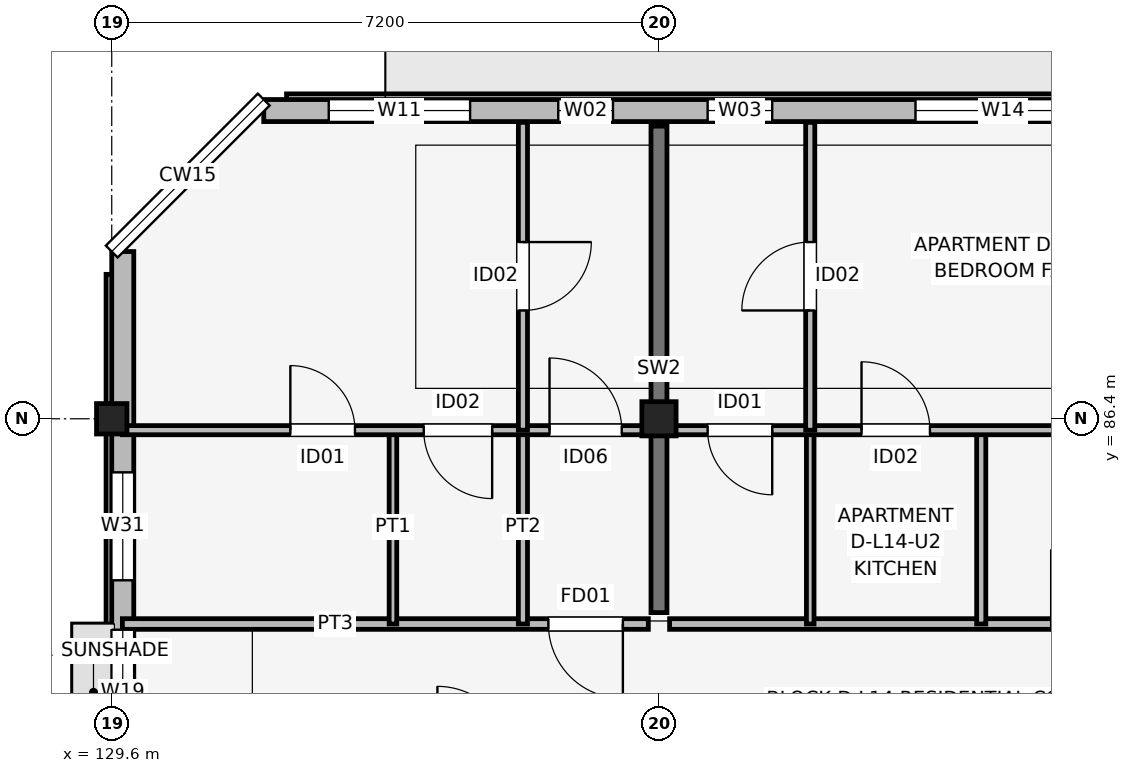
"""IFC4 building model, lengths in metres.
Left out: names, types, materials, properties, quantities, classifications, styles, units other than length and angle.
Written with IfcOpenShell. Run it as: python <this file> out.ifc"""

import sys

from ifc_helpers import new_model, si_unit, direction, frame, frame_2d, origin, origin_2d, place, context, subcontext, project, spatial, rectangle, extrude, element, fill, save


model = new_model("IFC4")
c1 = context("Model", 3, precision=1e-05, world=origin(), true_north=direction((0.0, 1.0)))
c2 = subcontext(c1, "Body", "Model", "MODEL_VIEW")
j1 = project(units=[si_unit("LENGTHUNIT", "METRE"), si_unit("PLANEANGLEUNIT", "RADIAN")], contexts=[c1])
p1 = place(None, origin())
s1 = spatial("IfcSite", under=j1, at=p1, CompositionType="ELEMENT")
p2 = place(p1, origin())
s2 = spatial("IfcBuilding", under=s1, at=p2, CompositionType="ELEMENT")
p3 = place(p2, frame((0.0, 0.0, 46.5)))
s3 = spatial("IfcBuildingStorey", under=s2, at=p3, CompositionType="ELEMENT", Elevation=46.5)
p4 = place(p3, frame((129.6, 86.4, 0.0), z_axis=(0.0, 0.0, 1.0), x_axis=(1.0, 0.0, 0.0)))
e1 = element("IfcColumn", 1, at=p4, inside=s3, PredefinedType="COLUMN", context=c2, shape_type="SweptSolid", body=[
    extrude(rectangle(XDim=0.4, YDim=0.4, at=origin_2d()), origin(), (0.0, 0.0, 1.0), 3.15),
])
p5 = place(p3, frame((136.8, 86.4, 0.0), z_axis=(0.0, 0.0, 1.0), x_axis=(1.0, 0.0, 0.0)))
e2 = element("IfcColumn", 2, at=p5, inside=s3, PredefinedType="COLUMN", context=c2, shape_type="SweptSolid", body=[
    extrude(rectangle(XDim=0.45, YDim=0.45, at=origin_2d()), origin(), (0.0, 0.0, 1.0), 3.15),
])
p6 = place(p3, frame((136.8, 83.85, 0.0), z_axis=(0.0, 0.0, 1.0), x_axis=(0.0, 1.0, 0.0)))
e3 = element("IfcWall", 3, at=p6, inside=s3, PredefinedType="SHEAR", context=c2, shape_type="SweptSolid", body=[
    extrude(rectangle(XDim=6.4, YDim=0.21, at=frame_2d((3.2, 0.0))), origin(), (0.0, 0.0, 1.0), 3.15),
])
p7 = place(p3, frame((163.6, 90.455, 0.0), z_axis=(0.0, 0.0, 1.0), x_axis=(-1.0, 0.0, 0.0)))
e4 = element("IfcWall", 4, at=p7, inside=s3, PredefinedType="SOLIDWALL", context=c2, shape_type="SweptSolid", body=[
    extrude(rectangle(XDim=32.0, YDim=0.29, at=frame_2d((16.0, 0.0))), origin(), (0.0, 0.0, 1.0), 2.48),
])
p8 = place(p7, frame((15.45, 0.0, 0.0), z_axis=(0.0, 0.0, 1.0), x_axis=(-1.0, 0.0, 0.0)))
e5 = element("IfcOpeningElement", 5, at=p8, cuts=e4, PredefinedType="OPENING", context=c2, shape_type="SweptSolid", body=[
    extrude(rectangle(XDim=2.1, YDim=2.2, at=frame_2d((1.05, 1.1))), frame((0.0, 0.155, 0.0), z_axis=(0.0, -1.0, 0.0), x_axis=(1.0, 0.0, 0.0)), (0.0, 0.0, 1.0), 0.31),
])
p9 = place(p7, frame((29.285, 0.0, 0.7)))
e6 = element("IfcOpeningElement", 6, at=p9, cuts=e4, PredefinedType="OPENING", context=c2, shape_type="SweptSolid", body=[
    extrude(rectangle(XDim=1.86, YDim=1.6, at=frame_2d((0.93, 0.8))), frame((0.0, 0.155, 0.0), z_axis=(0.0, -1.0, 0.0), x_axis=(1.0, 0.0, 0.0)), (0.0, 0.0, 1.0), 0.31),
])
p10 = place(p7, frame((27.405, 0.0, 0.75)))
e7 = element("IfcOpeningElement", 7, at=p10, cuts=e4, PredefinedType="OPENING", context=c2, shape_type="SweptSolid", body=[
    extrude(rectangle(XDim=0.72, YDim=1.35, at=frame_2d((0.36, 0.675))), frame((0.0, 0.155, 0.0), z_axis=(0.0, -1.0, 0.0), x_axis=(1.0, 0.0, 0.0)), (0.0, 0.0, 1.0), 0.31),
])
p11 = place(p7, frame((25.31, 0.0, 0.75)))
e8 = element("IfcOpeningElement", 8, at=p11, cuts=e4, PredefinedType="OPENING", context=c2, shape_type="SweptSolid", body=[
    extrude(rectangle(XDim=0.85, YDim=1.4, at=frame_2d((0.425, 0.7))), frame((0.0, 0.155, 0.0), z_axis=(0.0, -1.0, 0.0), x_axis=(1.0, 0.0, 0.0)), (0.0, 0.0, 1.0), 0.31),
])
p12 = place(p7, frame((21.125, 0.0, 0.7)))
e9 = element("IfcOpeningElement", 9, at=p12, cuts=e4, PredefinedType="OPENING", context=c2, shape_type="SweptSolid", body=[
    extrude(rectangle(XDim=2.3, YDim=1.65, at=frame_2d((1.15, 0.825))), frame((0.0, 0.155, 0.0), z_axis=(0.0, -1.0, 0.0), x_axis=(1.0, 0.0, 0.0)), (0.0, 0.0, 1.0), 0.31),
])
p13 = place(p7, frame((16.335, 0.0, 0.7)))
e10 = element("IfcOpeningElement", 10, at=p13, cuts=e4, PredefinedType="OPENING", context=c2, shape_type="SweptSolid", body=[
    extrude(rectangle(XDim=2.45, YDim=1.65, at=frame_2d((1.225, 0.825))), frame((0.0, 0.155, 0.0), z_axis=(0.0, -1.0, 0.0), x_axis=(1.0, 0.0, 0.0)), (0.0, 0.0, 1.0), 0.31),
])
p14 = place(p7, frame((10.725, 0.0, 0.75)))
e11 = element("IfcOpeningElement", 11, at=p14, cuts=e4, PredefinedType="OPENING", context=c2, shape_type="SweptSolid", body=[
    extrude(rectangle(XDim=1.22, YDim=1.5, at=frame_2d((0.61, 0.75))), frame((0.0, 0.155, 0.0), z_axis=(0.0, -1.0, 0.0), x_axis=(1.0, 0.0, 0.0)), (0.0, 0.0, 1.0), 0.31),
])
p15 = place(p7, frame((7.015, 0.0, 0.7)))
e12 = element("IfcOpeningElement", 12, at=p15, cuts=e4, PredefinedType="OPENING", context=c2, shape_type="SweptSolid", body=[
    extrude(rectangle(XDim=1.72, YDim=1.6, at=frame_2d((0.86, 0.8))), frame((0.0, 0.155, 0.0), z_axis=(0.0, -1.0, 0.0), x_axis=(1.0, 0.0, 0.0)), (0.0, 0.0, 1.0), 0.31),
])
p16 = place(p7, frame((3.375, 0.0, 0.75)))
e13 = element("IfcOpeningElement", 13, at=p16, cuts=e4, PredefinedType="OPENING", context=c2, shape_type="SweptSolid", body=[
    extrude(rectangle(XDim=1.46, YDim=1.55, at=frame_2d((0.73, 0.775))), frame((0.0, 0.155, 0.0), z_axis=(0.0, -1.0, 0.0), x_axis=(1.0, 0.0, 0.0)), (0.0, 0.0, 1.0), 0.31),
])
p17 = place(p7, frame((1.355, 0.0, 0.75)))
e14 = element("IfcOpeningElement", 14, at=p17, cuts=e4, PredefinedType="OPENING", context=c2, shape_type="SweptSolid", body=[
    extrude(rectangle(XDim=0.6, YDim=1.25, at=frame_2d((0.3, 0.625))), frame((0.0, 0.155, 0.0), z_axis=(0.0, -1.0, 0.0), x_axis=(1.0, 0.0, 0.0)), (0.0, 0.0, 1.0), 0.31),
])
p18 = place(p3, frame((129.745, 88.6, 0.0), z_axis=(0.0, 0.0, 1.0), x_axis=(0.0, -1.0, 0.0)))
e15 = element("IfcWall", 15, at=p18, inside=s3, PredefinedType="SOLIDWALL", context=c2, shape_type="SweptSolid", body=[
    extrude(rectangle(XDim=14.6, YDim=0.29, at=frame_2d((7.3, 0.0))), origin(), (0.0, 0.0, 1.0), 2.51),
])
p19 = place(p18, frame((4.975, 0.0, 1.05)))
e16 = element("IfcOpeningElement", 16, at=p19, cuts=e15, PredefinedType="OPENING", context=c2, shape_type="SweptSolid", body=[
    extrude(rectangle(XDim=1.65, YDim=1.15, at=frame_2d((0.825, 0.575))), frame((0.0, 0.155, 0.0), z_axis=(0.0, -1.0, 0.0), x_axis=(1.0, 0.0, 0.0)), (0.0, 0.0, 1.0), 0.31),
])
p20 = place(p18, frame((2.905, 0.0, 0.75)))
e17 = element("IfcOpeningElement", 17, at=p20, cuts=e15, PredefinedType="OPENING", context=c2, shape_type="SweptSolid", body=[
    extrude(rectangle(XDim=1.42, YDim=1.6, at=frame_2d((0.71, 0.8))), frame((0.0, 0.155, 0.0), z_axis=(0.0, -1.0, 0.0), x_axis=(1.0, 0.0, 0.0)), (0.0, 0.0, 1.0), 0.31),
])
p21 = place(p3, frame((129.74, 83.7, 0.0), z_axis=(0.0, 0.0, 1.0), x_axis=(1.0, 0.0, 0.0)))
e18 = element("IfcWall", 18, at=p21, inside=s3, PredefinedType="PARTITIONING", context=c2, shape_type="SweptSolid", body=[
    extrude(rectangle(XDim=6.92, YDim=0.14, at=frame_2d((3.46, 0.0))), origin(), (0.0, 0.0, 1.0), 2.38),
])
p22 = place(p21, frame((6.585, 0.0, 0.0), z_axis=(0.0, 0.0, 1.0), x_axis=(-1.0, 0.0, 0.0)))
e19 = element("IfcOpeningElement", 19, at=p22, cuts=e18, PredefinedType="OPENING", context=c2, shape_type="SweptSolid", body=[
    extrude(rectangle(XDim=0.98, YDim=2.1, at=frame_2d((0.49, 1.05))), frame((0.0, 0.08, 0.0), z_axis=(0.0, -1.0, 0.0), x_axis=(1.0, 0.0, 0.0)), (0.0, 0.0, 1.0), 0.16),
])
p23 = place(p3, frame((133.3, 83.7, 0.0), z_axis=(0.0, 0.0, 1.0), x_axis=(0.0, 1.0, 0.0)))
e20 = element("IfcWall", 20, at=p23, inside=s3, PredefinedType="PARTITIONING", context=c2, shape_type="SweptSolid", body=[
    extrude(rectangle(XDim=2.55, YDim=0.1, at=frame_2d((1.275, 0.0))), origin(), (0.0, 0.0, 1.0), 2.38),
])
p24 = place(p3, frame((135.01, 83.7, 0.0), z_axis=(0.0, 0.0, 1.0), x_axis=(0.0, 1.0, 0.0)))
e21 = element("IfcWall", 21, at=p24, inside=s3, PredefinedType="PARTITIONING", context=c2, shape_type="SweptSolid", body=[
    extrude(rectangle(XDim=2.55, YDim=0.12, at=frame_2d((1.275, 0.0))), origin(), (0.0, 0.0, 1.0), 2.38),
])
p25 = place(p3, frame((129.74, 86.25, 0.0), z_axis=(0.0, 0.0, 1.0), x_axis=(1.0, 0.0, 0.0)))
e22 = element("IfcWall", 22, at=p25, inside=s3, PredefinedType="PARTITIONING", context=c2, shape_type="SweptSolid", body=[
    extrude(rectangle(XDim=6.92, YDim=0.12, at=frame_2d((3.46, 0.0))), origin(), (0.0, 0.0, 1.0), 2.38),
])
p26 = place(p25, frame((2.21, 0.0, 0.0)))
e23 = element("IfcOpeningElement", 23, at=p26, cuts=e22, PredefinedType="OPENING", context=c2, shape_type="SweptSolid", body=[
    extrude(rectangle(XDim=0.85, YDim=2.08, at=frame_2d((0.425, 1.04))), frame((0.0, 0.07, 0.0), z_axis=(0.0, -1.0, 0.0), x_axis=(1.0, 0.0, 0.0)), (0.0, 0.0, 1.0), 0.14),
])
p27 = place(p25, frame((4.865, 0.0, 0.0), z_axis=(0.0, 0.0, 1.0), x_axis=(-1.0, 0.0, 0.0)))
e24 = element("IfcOpeningElement", 24, at=p27, cuts=e22, PredefinedType="OPENING", context=c2, shape_type="SweptSolid", body=[
    extrude(rectangle(XDim=0.9, YDim=2.08, at=frame_2d((0.45, 1.04))), frame((0.0, 0.07, 0.0), z_axis=(0.0, -1.0, 0.0), x_axis=(1.0, 0.0, 0.0)), (0.0, 0.0, 1.0), 0.14),
])
p28 = place(p25, frame((5.62, 0.0, 0.0)))
e25 = element("IfcOpeningElement", 25, at=p28, cuts=e22, PredefinedType="OPENING", context=c2, shape_type="SweptSolid", body=[
    extrude(rectangle(XDim=0.95, YDim=2.08, at=frame_2d((0.475, 1.04))), frame((0.0, 0.07, 0.0), z_axis=(0.0, -1.0, 0.0), x_axis=(1.0, 0.0, 0.0)), (0.0, 0.0, 1.0), 0.14),
])
p29 = place(p3, frame((135.01, 86.25, 0.0), z_axis=(0.0, 0.0, 1.0), x_axis=(0.0, 1.0, 0.0)))
e26 = element("IfcWall", 26, at=p29, inside=s3, PredefinedType="PARTITIONING", context=c2, shape_type="SweptSolid", body=[
    extrude(rectangle(XDim=4.05, YDim=0.12, at=frame_2d((2.025, 0.0))), origin(), (0.0, 0.0, 1.0), 2.38),
])
p30 = place(p29, frame((2.475, 0.0, 0.0), z_axis=(0.0, 0.0, 1.0), x_axis=(-1.0, 0.0, 0.0)))
e27 = element("IfcOpeningElement", 27, at=p30, cuts=e26, PredefinedType="OPENING", context=c2, shape_type="SweptSolid", body=[
    extrude(rectangle(XDim=0.9, YDim=2.08, at=frame_2d((0.45, 1.04))), frame((0.0, 0.07, 0.0), z_axis=(0.0, -1.0, 0.0), x_axis=(1.0, 0.0, 0.0)), (0.0, 0.0, 1.0), 0.14),
])
p31 = place(p3, frame((136.94, 83.7, 0.0), z_axis=(0.0, 0.0, 1.0), x_axis=(1.0, 0.0, 0.0)))
e28 = element("IfcWall", 28, at=p31, inside=s3, PredefinedType="PARTITIONING", context=c2, shape_type="SweptSolid", body=[
    extrude(rectangle(XDim=6.92, YDim=0.14, at=frame_2d((3.46, 0.0))), origin(), (0.0, 0.0, 1.0), 2.38),
])
p32 = place(p31, frame((5.02, 0.0, 0.0)))
e29 = element("IfcOpeningElement", 29, at=p32, cuts=e28, PredefinedType="OPENING", context=c2, shape_type="SweptSolid", body=[
    extrude(rectangle(XDim=0.98, YDim=2.1, at=frame_2d((0.49, 1.05))), frame((0.0, 0.08, 0.0), z_axis=(0.0, -1.0, 0.0), x_axis=(1.0, 0.0, 0.0)), (0.0, 0.0, 1.0), 0.16),
])
p33 = place(p3, frame((138.79, 83.7, 0.0), z_axis=(0.0, 0.0, 1.0), x_axis=(0.0, 1.0, 0.0)))
e30 = element("IfcWall", 30, at=p33, inside=s3, PredefinedType="PARTITIONING", context=c2, shape_type="SweptSolid", body=[
    extrude(rectangle(XDim=2.55, YDim=0.1, at=frame_2d((1.275, 0.0))), origin(), (0.0, 0.0, 1.0), 2.38),
])
p34 = place(p3, frame((141.04, 83.7, 0.0), z_axis=(0.0, 0.0, 1.0), x_axis=(0.0, 1.0, 0.0)))
e31 = element("IfcWall", 31, at=p34, inside=s3, PredefinedType="PARTITIONING", context=c2, shape_type="SweptSolid", body=[
    extrude(rectangle(XDim=2.55, YDim=0.12, at=frame_2d((1.275, 0.0))), origin(), (0.0, 0.0, 1.0), 2.38),
])
p35 = place(p3, frame((136.94, 86.25, 0.0), z_axis=(0.0, 0.0, 1.0), x_axis=(1.0, 0.0, 0.0)))
e32 = element("IfcWall", 32, at=p35, inside=s3, PredefinedType="PARTITIONING", context=c2, shape_type="SweptSolid", body=[
    extrude(rectangle(XDim=6.92, YDim=0.12, at=frame_2d((3.46, 0.0))), origin(), (0.0, 0.0, 1.0), 2.38),
])
p36 = place(p35, frame((1.35, 0.0, 0.0), z_axis=(0.0, 0.0, 1.0), x_axis=(-1.0, 0.0, 0.0)))
e33 = element("IfcOpeningElement", 33, at=p36, cuts=e32, PredefinedType="OPENING", context=c2, shape_type="SweptSolid", body=[
    extrude(rectangle(XDim=0.85, YDim=2.08, at=frame_2d((0.425, 1.04))), frame((0.0, 0.07, 0.0), z_axis=(0.0, -1.0, 0.0), x_axis=(1.0, 0.0, 0.0)), (0.0, 0.0, 1.0), 0.14),
])
p37 = place(p35, frame((2.525, 0.0, 0.0)))
e34 = element("IfcOpeningElement", 34, at=p37, cuts=e32, PredefinedType="OPENING", context=c2, shape_type="SweptSolid", body=[
    extrude(rectangle(XDim=0.9, YDim=2.08, at=frame_2d((0.45, 1.04))), frame((0.0, 0.07, 0.0), z_axis=(0.0, -1.0, 0.0), x_axis=(1.0, 0.0, 0.0)), (0.0, 0.0, 1.0), 0.14),
])
p38 = place(p35, frame((5.985, 0.0, 0.0), z_axis=(0.0, 0.0, 1.0), x_axis=(-1.0, 0.0, 0.0)))
e35 = element("IfcOpeningElement", 35, at=p38, cuts=e32, PredefinedType="OPENING", context=c2, shape_type="SweptSolid", body=[
    extrude(rectangle(XDim=0.95, YDim=2.08, at=frame_2d((0.475, 1.04))), frame((0.0, 0.07, 0.0), z_axis=(0.0, -1.0, 0.0), x_axis=(1.0, 0.0, 0.0)), (0.0, 0.0, 1.0), 0.14),
])
p39 = place(p3, frame((138.79, 86.25, 0.0), z_axis=(0.0, 0.0, 1.0), x_axis=(0.0, 1.0, 0.0)))
e36 = element("IfcWall", 36, at=p39, inside=s3, PredefinedType="PARTITIONING", context=c2, shape_type="SweptSolid", body=[
    extrude(rectangle(XDim=4.05, YDim=0.12, at=frame_2d((2.025, 0.0))), origin(), (0.0, 0.0, 1.0), 2.38),
])
p40 = place(p39, frame((1.575, 0.0, 0.0)))
e37 = element("IfcOpeningElement", 37, at=p40, cuts=e36, PredefinedType="OPENING", context=c2, shape_type="SweptSolid", body=[
    extrude(rectangle(XDim=0.9, YDim=2.08, at=frame_2d((0.45, 1.04))), frame((0.0, 0.07, 0.0), z_axis=(0.0, -1.0, 0.0), x_axis=(1.0, 0.0, 0.0)), (0.0, 0.0, 1.0), 0.14),
])
p41 = place(p9, origin())
e38 = element("IfcWindow", 38, at=p41, inside=s3, PartitioningType="SINGLE_PANEL", PredefinedType="WINDOW", context=c2, shape_type="SweptSolid", body=[
    extrude(rectangle(XDim=1.86, YDim=1.6, at=frame_2d((0.93, 0.8))), frame((0.0, 0.03, 0.0), z_axis=(0.0, -1.0, 0.0), x_axis=(1.0, 0.0, 0.0)), (0.0, 0.0, 1.0), 0.06),
])
fill(e6, e38)
p42 = place(p10, origin())
e39 = element("IfcWindow", 39, at=p42, inside=s3, PartitioningType="SINGLE_PANEL", PredefinedType="WINDOW", context=c2, shape_type="SweptSolid", body=[
    extrude(rectangle(XDim=0.72, YDim=1.35, at=frame_2d((0.36, 0.675))), frame((0.0, 0.03, 0.0), z_axis=(0.0, -1.0, 0.0), x_axis=(1.0, 0.0, 0.0)), (0.0, 0.0, 1.0), 0.06),
])
fill(e7, e39)
p43 = place(p11, origin())
e40 = element("IfcWindow", 40, at=p43, inside=s3, PartitioningType="SINGLE_PANEL", PredefinedType="WINDOW", context=c2, shape_type="SweptSolid", body=[
    extrude(rectangle(XDim=0.85, YDim=1.4, at=frame_2d((0.425, 0.7))), frame((0.0, 0.03, 0.0), z_axis=(0.0, -1.0, 0.0), x_axis=(1.0, 0.0, 0.0)), (0.0, 0.0, 1.0), 0.06),
])
fill(e8, e40)
p44 = place(p12, origin())
e41 = element("IfcWindow", 41, at=p44, inside=s3, PartitioningType="SINGLE_PANEL", PredefinedType="WINDOW", context=c2, shape_type="SweptSolid", body=[
    extrude(rectangle(XDim=2.3, YDim=1.65, at=frame_2d((1.15, 0.825))), frame((0.0, 0.03, 0.0), z_axis=(0.0, -1.0, 0.0), x_axis=(1.0, 0.0, 0.0)), (0.0, 0.0, 1.0), 0.06),
])
fill(e9, e41)
p45 = place(p19, origin())
e42 = element("IfcWindow", 42, at=p45, inside=s3, PartitioningType="SINGLE_PANEL", PredefinedType="WINDOW", context=c2, shape_type="SweptSolid", body=[
    extrude(rectangle(XDim=1.65, YDim=1.15, at=frame_2d((0.825, 0.575))), frame((0.0, 0.03, 0.0), z_axis=(0.0, -1.0, 0.0), x_axis=(1.0, 0.0, 0.0)), (0.0, 0.0, 1.0), 0.06),
])
fill(e16, e42)
p46 = place(p20, origin())
e43 = element("IfcWindow", 43, at=p46, inside=s3, PartitioningType="SINGLE_PANEL", PredefinedType="WINDOW", context=c2, shape_type="SweptSolid", body=[
    extrude(rectangle(XDim=1.42, YDim=1.6, at=frame_2d((0.71, 0.8))), frame((0.0, 0.03, 0.0), z_axis=(0.0, -1.0, 0.0), x_axis=(1.0, 0.0, 0.0)), (0.0, 0.0, 1.0), 0.06),
])
fill(e17, e43)
p47 = place(p22, origin())
e44 = element("IfcDoor", 44, at=p47, inside=s3, OperationType="SINGLE_SWING_RIGHT", PredefinedType="DOOR", context=c2, shape_type="SweptSolid", body=[
    extrude(rectangle(XDim=0.98, YDim=2.1, at=frame_2d((0.49, 1.05))), frame((0.0, 0.025, 0.0), z_axis=(0.0, -1.0, 0.0), x_axis=(1.0, 0.0, 0.0)), (0.0, 0.0, 1.0), 0.05),
])
fill(e19, e44)
p48 = place(p26, origin())
e45 = element("IfcDoor", 45, at=p48, inside=s3, OperationType="SINGLE_SWING_LEFT", PredefinedType="DOOR", context=c2, shape_type="SweptSolid", body=[
    extrude(rectangle(XDim=0.85, YDim=2.08, at=frame_2d((0.425, 1.04))), frame((0.0, 0.025, 0.0), z_axis=(0.0, -1.0, 0.0), x_axis=(1.0, 0.0, 0.0)), (0.0, 0.0, 1.0), 0.05),
])
fill(e23, e45)
p49 = place(p27, origin())
e46 = element("IfcDoor", 46, at=p49, inside=s3, OperationType="SINGLE_SWING_RIGHT", PredefinedType="DOOR", context=c2, shape_type="SweptSolid", body=[
    extrude(rectangle(XDim=0.9, YDim=2.08, at=frame_2d((0.45, 1.04))), frame((0.0, 0.025, 0.0), z_axis=(0.0, -1.0, 0.0), x_axis=(1.0, 0.0, 0.0)), (0.0, 0.0, 1.0), 0.05),
])
fill(e24, e46)
p50 = place(p28, origin())
e47 = element("IfcDoor", 47, at=p50, inside=s3, OperationType="SINGLE_SWING_LEFT", PredefinedType="DOOR", context=c2, shape_type="SweptSolid", body=[
    extrude(rectangle(XDim=0.95, YDim=2.08, at=frame_2d((0.475, 1.04))), frame((0.0, 0.025, 0.0), z_axis=(0.0, -1.0, 0.0), x_axis=(1.0, 0.0, 0.0)), (0.0, 0.0, 1.0), 0.05),
])
fill(e25, e47)
p51 = place(p30, origin())
e48 = element("IfcDoor", 48, at=p51, inside=s3, OperationType="SINGLE_SWING_RIGHT", PredefinedType="DOOR", context=c2, shape_type="SweptSolid", body=[
    extrude(rectangle(XDim=0.9, YDim=2.08, at=frame_2d((0.45, 1.04))), frame((0.0, 0.025, 0.0), z_axis=(0.0, -1.0, 0.0), x_axis=(1.0, 0.0, 0.0)), (0.0, 0.0, 1.0), 0.05),
])
fill(e27, e48)
p52 = place(p36, origin())
e49 = element("IfcDoor", 49, at=p52, inside=s3, OperationType="SINGLE_SWING_RIGHT", PredefinedType="DOOR", context=c2, shape_type="SweptSolid", body=[
    extrude(rectangle(XDim=0.85, YDim=2.08, at=frame_2d((0.425, 1.04))), frame((0.0, 0.025, 0.0), z_axis=(0.0, -1.0, 0.0), x_axis=(1.0, 0.0, 0.0)), (0.0, 0.0, 1.0), 0.05),
])
fill(e33, e49)
p53 = place(p37, origin())
e50 = element("IfcDoor", 50, at=p53, inside=s3, OperationType="SINGLE_SWING_LEFT", PredefinedType="DOOR", context=c2, shape_type="SweptSolid", body=[
    extrude(rectangle(XDim=0.9, YDim=2.08, at=frame_2d((0.45, 1.04))), frame((0.0, 0.025, 0.0), z_axis=(0.0, -1.0, 0.0), x_axis=(1.0, 0.0, 0.0)), (0.0, 0.0, 1.0), 0.05),
])
fill(e34, e50)
p54 = place(p40, origin())
e51 = element("IfcDoor", 51, at=p54, inside=s3, OperationType="SINGLE_SWING_LEFT", PredefinedType="DOOR", context=c2, shape_type="SweptSolid", body=[
    extrude(rectangle(XDim=0.9, YDim=2.08, at=frame_2d((0.45, 1.04))), frame((0.0, 0.025, 0.0), z_axis=(0.0, -1.0, 0.0), x_axis=(1.0, 0.0, 0.0)), (0.0, 0.0, 1.0), 0.05),
])
fill(e37, e51)
save(model, sys.argv[1])
